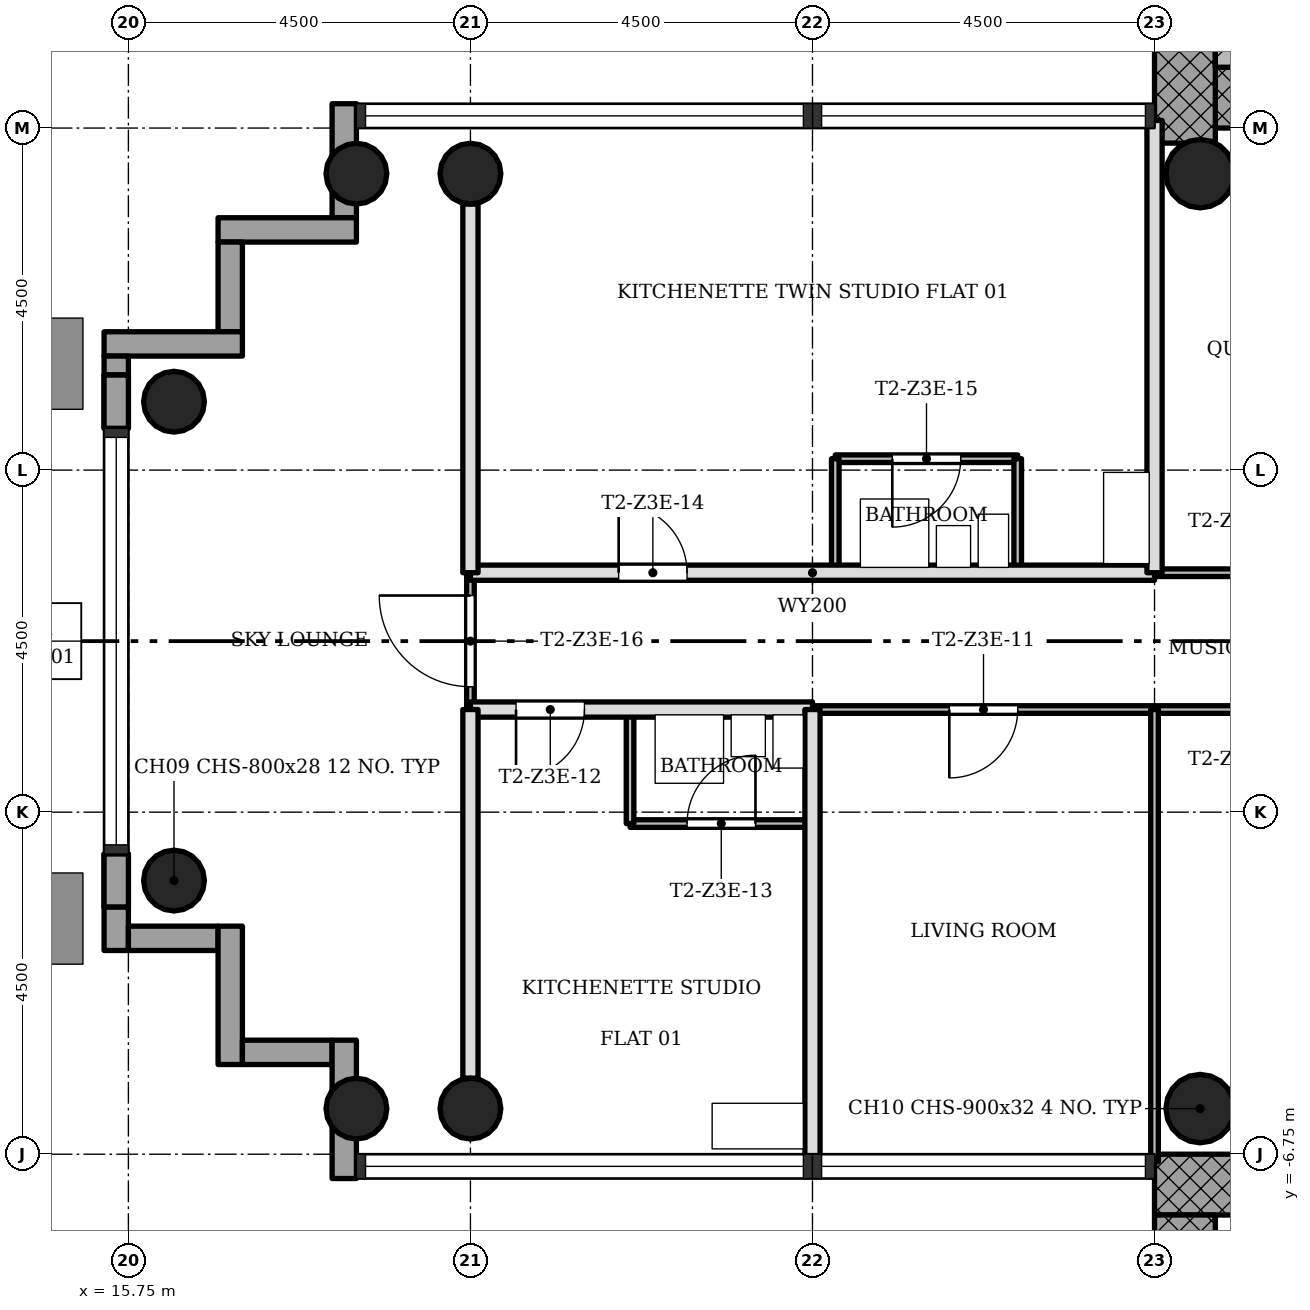
"""IFC4 building model, lengths in metres.
Left out: names, types, materials, properties, quantities, classifications, styles, units other than length and angle.
Written with IfcOpenShell. Run it as: python <this file> out.ifc"""

import sys

from ifc_helpers import new_model, si_unit, direction, frame, frame_2d, origin, origin_2d, place, context, subcontext, project, spatial, rectangle, hollow_circle, extrude, element, fill, save


model = new_model("IFC4")
c1 = context("Model", 3, precision=1e-05, world=origin(), true_north=direction((0.0, 1.0)))
c2 = subcontext(c1, "Body", "Model", "MODEL_VIEW")
j1 = project(units=[si_unit("LENGTHUNIT", "METRE"), si_unit("PLANEANGLEUNIT", "RADIAN")], contexts=[c1])
p1 = place(None, origin())
s1 = spatial("IfcSite", under=j1, at=p1, CompositionType="ELEMENT")
p2 = place(p1, origin())
s2 = spatial("IfcBuilding", under=s1, at=p2, CompositionType="ELEMENT")
p3 = place(p2, frame((0.0, 0.0, 177.9)))
s3 = spatial("IfcBuildingStorey", under=s2, at=p3, CompositionType="ELEMENT", Elevation=177.9)
p4 = place(p3, frame((30.05, 7.15, 0.0), z_axis=(0.0, 0.0, 1.0), x_axis=(1.0, 0.0, 0.0)))
e1 = element("IfcWall", 1, at=p4, inside=s3, PredefinedType="SHEAR", context=c2, shape_type="SweptSolid", body=[
    extrude(rectangle(XDim=12.7, YDim=0.8, at=frame_2d((6.35, 0.0))), origin(), (0.0, 0.0, 1.0), 3.4),
])
p5 = place(p4, frame((5.05, 0.0, 0.0)))
e2 = element("IfcOpeningElement", 2, at=p5, cuts=e1, PredefinedType="OPENING", context=c2, shape_type="SweptSolid", body=[
    extrude(rectangle(XDim=1.8, YDim=2.1, at=frame_2d((0.9, 1.05))), frame((0.0, 0.41, 0.0), z_axis=(0.0, -1.0, 0.0), x_axis=(1.0, 0.0, 0.0)), (0.0, 0.0, 1.0), 0.82),
])
p6 = place(p3, frame((29.65, 15.348, 0.0), z_axis=(0.0, 0.0, 1.0), x_axis=(0.0, -1.0, 0.0)))
e3 = element("IfcWall", 3, at=p6, inside=s3, PredefinedType="SHEAR", context=c2, shape_type="SweptSolid", body=[
    extrude(rectangle(XDim=8.796, YDim=0.8, at=frame_2d((4.398, 0.0))), origin(), (0.0, 0.0, 1.0), 3.4),
])
p7 = place(p3, frame((41.95, -7.15, 0.0), z_axis=(0.0, 0.0, 1.0), x_axis=(-1.0, 0.0, 0.0)))
e4 = element("IfcWall", 4, at=p7, inside=s3, PredefinedType="SHEAR", context=c2, shape_type="SweptSolid", body=[
    extrude(rectangle(XDim=12.7, YDim=0.8, at=frame_2d((6.35, 0.0))), origin(), (0.0, 0.0, 1.0), 3.4),
])
p8 = place(p7, frame((5.05, 0.0, 0.0)))
e5 = element("IfcOpeningElement", 5, at=p8, cuts=e4, PredefinedType="OPENING", context=c2, shape_type="SweptSolid", body=[
    extrude(rectangle(XDim=1.8, YDim=2.1, at=frame_2d((0.9, 1.05))), frame((0.0, 0.41, 0.0), z_axis=(0.0, -1.0, 0.0), x_axis=(1.0, 0.0, 0.0)), (0.0, 0.0, 1.0), 0.82),
])
p9 = place(p3, frame((29.65, -7.55, 0.0), z_axis=(0.0, 0.0, 1.0), x_axis=(0.0, -1.0, 0.0)))
e6 = element("IfcWall", 6, at=p9, inside=s3, PredefinedType="SHEAR", context=c2, shape_type="SweptSolid", body=[
    extrude(rectangle(XDim=8.2, YDim=0.8, at=frame_2d((4.1, 0.0))), origin(), (0.0, 0.0, 1.0), 3.4),
])
for number, where, z_axis, x_axis in (
    (7, (20.25, 6.15, 0.0), (0.0, 0.0, 1.0), (1.0, 0.0, 0.0)),
    (8, (20.25, -6.15, 0.0), (0.0, 0.0, 1.0), (1.0, 0.0, 0.0)),
    (9, (18.75, 6.15, 0.0), (0.0, 0.0, 1.0), (1.0, 0.0, 0.0)),
    (10, (18.75, -6.15, 0.0), (0.0, 0.0, 1.0), (1.0, 0.0, 0.0)),
    (11, (16.35, 3.15, 0.0), (0.0, 0.0, 1.0), (1.0, 0.0, 0.0)),
    (12, (16.35, -3.15, 0.0), (0.0, 0.0, 1.0), (1.0, 0.0, 0.0)),
):
    element("IfcColumn", number, at=place(p3, frame(where, z_axis=z_axis, x_axis=x_axis)), inside=s3, PredefinedType="COLUMN", context=c2, shape_type="SweptSolid", body=[
        extrude(hollow_circle(Radius=0.4, WallThickness=0.028, at=origin_2d()), origin(), (0.0, 0.0, 1.0), 3.4),
    ])
for number, where, z_axis, x_axis in (
    (13, (29.85, 6.15, 0.0), (0.0, 0.0, 1.0), (1.0, 0.0, 0.0)),
    (14, (29.85, -6.15, 0.0), (0.0, 0.0, 1.0), (1.0, 0.0, 0.0)),
):
    element("IfcColumn", number, at=place(p3, frame(where, z_axis=z_axis, x_axis=x_axis)), inside=s3, PredefinedType="COLUMN", context=c2, shape_type="SweptSolid", body=[
        extrude(hollow_circle(Radius=0.45, WallThickness=0.032, at=origin_2d()), origin(), (0.0, 0.0, 1.0), 3.4),
    ])
p10 = place(p3, frame((18.59, 7.07, -0.3), z_axis=(0.0, 0.0, 1.0), x_axis=(0.0, -1.0, 0.0)))
e15 = element("IfcWall", 15, at=p10, inside=s3, PredefinedType="STANDARD", context=c2, shape_type="SweptSolid", body=[
    extrude(rectangle(XDim=1.5, YDim=0.32, at=frame_2d((0.75, 0.0))), origin(), (0.0, 0.0, 1.0), 3.4),
])
p11 = place(p3, frame((18.75, 5.41, -0.3), z_axis=(0.0, 0.0, 1.0), x_axis=(-1.0, 0.0, 0.0)))
e16 = element("IfcWall", 16, at=p11, inside=s3, PredefinedType="STANDARD", context=c2, shape_type="SweptSolid", body=[
    extrude(rectangle(XDim=1.82, YDim=0.32, at=frame_2d((0.91, 0.0))), origin(), (0.0, 0.0, 1.0), 3.4),
])
p12 = place(p3, frame((17.09, 5.25, -0.3), z_axis=(0.0, 0.0, 1.0), x_axis=(0.0, -1.0, 0.0)))
e17 = element("IfcWall", 17, at=p12, inside=s3, PredefinedType="STANDARD", context=c2, shape_type="SweptSolid", body=[
    extrude(rectangle(XDim=1.18, YDim=0.32, at=frame_2d((0.59, 0.0))), origin(), (0.0, 0.0, 1.0), 3.4),
])
p13 = place(p3, frame((17.25, 3.91, -0.3), z_axis=(0.0, 0.0, 1.0), x_axis=(-1.0, 0.0, 0.0)))
e18 = element("IfcWall", 18, at=p13, inside=s3, PredefinedType="STANDARD", context=c2, shape_type="SweptSolid", body=[
    extrude(rectangle(XDim=1.82, YDim=0.32, at=frame_2d((0.91, 0.0))), origin(), (0.0, 0.0, 1.0), 3.4),
])
p14 = place(p3, frame((15.59, 3.75, 0.0), z_axis=(0.0, 0.0, 1.0), x_axis=(0.0, -1.0, 0.0)))
e19 = element("IfcWall", 19, at=p14, inside=s3, PredefinedType="STANDARD", context=c2, shape_type="SweptSolid", body=[
    extrude(rectangle(XDim=0.25, YDim=0.32, at=frame_2d((0.125, 0.0))), origin(), (0.0, 0.0, 1.0), 3.1),
])
p15 = place(p3, frame((15.59, 3.5, 0.0), z_axis=(0.0, 0.0, 1.0), x_axis=(0.0, -1.0, 0.0)))
e20 = element("IfcWall", 20, at=p15, inside=s3, PredefinedType="STANDARD", context=c2, shape_type="SweptSolid", body=[
    extrude(rectangle(XDim=0.7, YDim=0.32, at=frame_2d((0.35, 0.0))), origin(), (0.0, 0.0, 1.0), 2.51),
])
p16 = place(p3, frame((15.59, 3.5, 2.98), z_axis=(0.0, 0.0, 1.0), x_axis=(0.0, -1.0, 0.0)))
e21 = element("IfcWall", 21, at=p16, inside=s3, PredefinedType="STANDARD", context=c2, shape_type="SweptSolid", body=[
    extrude(rectangle(XDim=0.7, YDim=0.32, at=frame_2d((0.35, 0.0))), origin(), (0.0, 0.0, 1.0), 0.12),
])
p17 = place(p3, frame((15.59, -2.8, 0.0), z_axis=(0.0, 0.0, 1.0), x_axis=(0.0, -1.0, 0.0)))
e22 = element("IfcWall", 22, at=p17, inside=s3, PredefinedType="STANDARD", context=c2, shape_type="SweptSolid", body=[
    extrude(rectangle(XDim=0.7, YDim=0.32, at=frame_2d((0.35, 0.0))), origin(), (0.0, 0.0, 1.0), 2.51),
])
p18 = place(p3, frame((15.59, -2.8, 2.98), z_axis=(0.0, 0.0, 1.0), x_axis=(0.0, -1.0, 0.0)))
e23 = element("IfcWall", 23, at=p18, inside=s3, PredefinedType="STANDARD", context=c2, shape_type="SweptSolid", body=[
    extrude(rectangle(XDim=0.7, YDim=0.32, at=frame_2d((0.35, 0.0))), origin(), (0.0, 0.0, 1.0), 0.12),
])
p19 = place(p3, frame((15.59, -3.5, 0.0), z_axis=(0.0, 0.0, 1.0), x_axis=(0.0, -1.0, 0.0)))
e24 = element("IfcWall", 24, at=p19, inside=s3, PredefinedType="STANDARD", context=c2, shape_type="SweptSolid", body=[
    extrude(rectangle(XDim=0.57, YDim=0.32, at=frame_2d((0.285, 0.0))), origin(), (0.0, 0.0, 1.0), 3.1),
])
p20 = place(p3, frame((15.75, -3.91, -0.3), z_axis=(0.0, 0.0, 1.0), x_axis=(1.0, 0.0, 0.0)))
e25 = element("IfcWall", 25, at=p20, inside=s3, PredefinedType="STANDARD", context=c2, shape_type="SweptSolid", body=[
    extrude(rectangle(XDim=1.18, YDim=0.32, at=frame_2d((0.59, 0.0))), origin(), (0.0, 0.0, 1.0), 3.4),
])
p21 = place(p3, frame((17.09, -3.75, -0.3), z_axis=(0.0, 0.0, 1.0), x_axis=(0.0, -1.0, 0.0)))
e26 = element("IfcWall", 26, at=p21, inside=s3, PredefinedType="STANDARD", context=c2, shape_type="SweptSolid", body=[
    extrude(rectangle(XDim=1.82, YDim=0.32, at=frame_2d((0.91, 0.0))), origin(), (0.0, 0.0, 1.0), 3.4),
])
p22 = place(p3, frame((17.25, -5.41, -0.3), z_axis=(0.0, 0.0, 1.0), x_axis=(1.0, 0.0, 0.0)))
e27 = element("IfcWall", 27, at=p22, inside=s3, PredefinedType="STANDARD", context=c2, shape_type="SweptSolid", body=[
    extrude(rectangle(XDim=1.18, YDim=0.32, at=frame_2d((0.59, 0.0))), origin(), (0.0, 0.0, 1.0), 3.4),
])
p23 = place(p3, frame((18.59, -5.25, -0.3), z_axis=(0.0, 0.0, 1.0), x_axis=(0.0, -1.0, 0.0)))
e28 = element("IfcWall", 28, at=p23, inside=s3, PredefinedType="STANDARD", context=c2, shape_type="SweptSolid", body=[
    extrude(rectangle(XDim=1.82, YDim=0.32, at=frame_2d((0.91, 0.0))), origin(), (0.0, 0.0, 1.0), 3.4),
])
p24 = place(p3, frame((24.75, -2.4, 0.0), z_axis=(0.0, 0.0, 1.0), x_axis=(-1.0, 0.0, 0.0)))
e29 = element("IfcWall", 29, at=p24, inside=s3, PredefinedType="PARTITIONING", context=c2, shape_type="SweptSolid", body=[
    extrude(rectangle(XDim=2.4, YDim=0.1, at=frame_2d((1.2, 0.0))), origin(), (0.0, 0.0, 1.0), 3.0),
])
p25 = place(p24, frame((0.75, 0.0, 0.0)))
e30 = element("IfcOpeningElement", 30, at=p25, cuts=e29, PredefinedType="OPENING", context=c2, shape_type="SweptSolid", body=[
    extrude(rectangle(XDim=0.9, YDim=2.1, at=frame_2d((0.45, 1.05))), frame((0.0, 0.06, 0.0), z_axis=(0.0, -1.0, 0.0), x_axis=(1.0, 0.0, 0.0)), (0.0, 0.0, 1.0), 0.12),
])
p26 = place(p3, frame((31.5, -0.9, 0.0), z_axis=(0.0, 0.0, 1.0), x_axis=(-1.0, 0.0, 0.0)))
e31 = element("IfcWall", 31, at=p26, inside=s3, PredefinedType="PARTITIONING", context=c2, shape_type="SweptSolid", body=[
    extrude(rectangle(XDim=6.75, YDim=0.1, at=frame_2d((3.375, 0.0))), origin(), (0.0, 0.0, 1.0), 3.0),
])
p27 = place(p26, frame((4.05, 0.0, 0.0)))
e32 = element("IfcOpeningElement", 32, at=p27, cuts=e31, PredefinedType="OPENING", context=c2, shape_type="SweptSolid", body=[
    extrude(rectangle(XDim=0.9, YDim=2.1, at=frame_2d((0.45, 1.05))), frame((0.0, 0.06, 0.0), z_axis=(0.0, -1.0, 0.0), x_axis=(1.0, 0.0, 0.0)), (0.0, 0.0, 1.0), 0.12),
])
p28 = place(p3, frame((24.75, -0.9, 0.0), z_axis=(0.0, 0.0, 1.0), x_axis=(-1.0, 0.0, 0.0)))
e33 = element("IfcWall", 33, at=p28, inside=s3, PredefinedType="SOLIDWALL", context=c2, shape_type="SweptSolid", body=[
    extrude(rectangle(XDim=4.5, YDim=0.2, at=frame_2d((2.25, 0.0))), origin(), (0.0, 0.0, 1.0), 3.0),
])
p29 = place(p28, frame((3.0, 0.0, 0.0)))
e34 = element("IfcOpeningElement", 34, at=p29, cuts=e33, PredefinedType="OPENING", context=c2, shape_type="SweptSolid", body=[
    extrude(rectangle(XDim=0.9, YDim=2.1, at=frame_2d((0.45, 1.05))), frame((0.0, 0.11, 0.0), z_axis=(0.0, -1.0, 0.0), x_axis=(1.0, 0.0, 0.0)), (0.0, 0.0, 1.0), 0.22),
])
p30 = place(p3, frame((31.5, 0.9, 0.0), z_axis=(0.0, 0.0, 1.0), x_axis=(-1.0, 0.0, 0.0)))
e35 = element("IfcWall", 35, at=p30, inside=s3, PredefinedType="PARTITIONING", context=c2, shape_type="SweptSolid", body=[
    extrude(rectangle(XDim=2.25, YDim=0.1, at=frame_2d((1.125, 0.0))), origin(), (0.0, 0.0, 1.0), 3.0),
])
p31 = place(p3, frame((29.25, 0.9, 0.0), z_axis=(0.0, 0.0, 1.0), x_axis=(-1.0, 0.0, 0.0)))
e36 = element("IfcWall", 36, at=p31, inside=s3, PredefinedType="SOLIDWALL", context=c2, shape_type="SweptSolid", body=[
    extrude(rectangle(XDim=9.0, YDim=0.2, at=frame_2d((4.5, 0.0))), origin(), (0.0, 0.0, 1.0), 3.0),
])
p32 = place(p31, frame((6.15, 0.0, 0.0)))
e37 = element("IfcOpeningElement", 37, at=p32, cuts=e36, PredefinedType="OPENING", context=c2, shape_type="SweptSolid", body=[
    extrude(rectangle(XDim=0.9, YDim=2.1, at=frame_2d((0.45, 1.05))), frame((0.0, 0.11, 0.0), z_axis=(0.0, -1.0, 0.0), x_axis=(1.0, 0.0, 0.0)), (0.0, 0.0, 1.0), 0.22),
])
p33 = place(p3, frame((27.45, 2.4, 0.0), z_axis=(0.0, 0.0, 1.0), x_axis=(-1.0, 0.0, 0.0)))
e38 = element("IfcWall", 38, at=p33, inside=s3, PredefinedType="PARTITIONING", context=c2, shape_type="SweptSolid", body=[
    extrude(rectangle(XDim=2.4, YDim=0.1, at=frame_2d((1.2, 0.0))), origin(), (0.0, 0.0, 1.0), 3.0),
])
p34 = place(p33, frame((0.75, 0.0, 0.0)))
e39 = element("IfcOpeningElement", 39, at=p34, cuts=e38, PredefinedType="OPENING", context=c2, shape_type="SweptSolid", body=[
    extrude(rectangle(XDim=0.9, YDim=2.1, at=frame_2d((0.45, 1.05))), frame((0.0, 0.06, 0.0), z_axis=(0.0, -1.0, 0.0), x_axis=(1.0, 0.0, 0.0)), (0.0, 0.0, 1.0), 0.12),
])
p35 = place(p3, frame((29.25, -6.85, 0.0), z_axis=(0.0, 0.0, 1.0), x_axis=(0.0, 1.0, 0.0)))
e40 = element("IfcWall", 40, at=p35, inside=s3, PredefinedType="PARTITIONING", context=c2, shape_type="SweptSolid", body=[
    extrude(rectangle(XDim=5.95, YDim=0.1, at=frame_2d((2.975, 0.0))), origin(), (0.0, 0.0, 1.0), 3.0),
])
p36 = place(p3, frame((29.25, 0.9, 0.0), z_axis=(0.0, 0.0, 1.0), x_axis=(0.0, 1.0, 0.0)))
e41 = element("IfcWall", 41, at=p36, inside=s3, PredefinedType="SOLIDWALL", context=c2, shape_type="SweptSolid", body=[
    extrude(rectangle(XDim=5.95, YDim=0.2, at=frame_2d((2.975, 0.0))), origin(), (0.0, 0.0, 1.0), 3.0),
])
for number, where, z_axis, x_axis in (
    (42, (27.45, 0.9, 0.0), (0.0, 0.0, 1.0), (0.0, 1.0, 0.0)),
    (43, (25.05, 0.9, 0.0), (0.0, 0.0, 1.0), (0.0, 1.0, 0.0)),
):
    element("IfcWall", number, at=place(p3, frame(where, z_axis=z_axis, x_axis=x_axis)), inside=s3, PredefinedType="PARTITIONING", context=c2, shape_type="SweptSolid", body=[
        extrude(rectangle(XDim=1.5, YDim=0.1, at=frame_2d((0.75, 0.0))), origin(), (0.0, 0.0, 1.0), 3.0),
    ])
p37 = place(p3, frame((24.75, -6.85, 0.0), z_axis=(0.0, 0.0, 1.0), x_axis=(0.0, 1.0, 0.0)))
e44 = element("IfcWall", 44, at=p37, inside=s3, PredefinedType="SOLIDWALL", context=c2, shape_type="SweptSolid", body=[
    extrude(rectangle(XDim=5.95, YDim=0.2, at=frame_2d((2.975, 0.0))), origin(), (0.0, 0.0, 1.0), 3.0),
])
p38 = place(p3, frame((22.35, -2.4, 0.0), z_axis=(0.0, 0.0, 1.0), x_axis=(0.0, 1.0, 0.0)))
e45 = element("IfcWall", 45, at=p38, inside=s3, PredefinedType="PARTITIONING", context=c2, shape_type="SweptSolid", body=[
    extrude(rectangle(XDim=1.5, YDim=0.1, at=frame_2d((0.75, 0.0))), origin(), (0.0, 0.0, 1.0), 3.0),
])
p39 = place(p3, frame((20.25, -0.9, 0.0), z_axis=(0.0, 0.0, 1.0), x_axis=(0.0, 1.0, 0.0)))
e46 = element("IfcWall", 46, at=p39, inside=s3, PredefinedType="PARTITIONING", context=c2, shape_type="SweptSolid", body=[
    extrude(rectangle(XDim=1.8, YDim=0.1, at=frame_2d((0.9, 0.0))), origin(), (0.0, 0.0, 1.0), 3.0),
])
p40 = place(p39, frame((0.3, 0.0, 0.0)))
e47 = element("IfcOpeningElement", 47, at=p40, cuts=e46, PredefinedType="OPENING", context=c2, shape_type="SweptSolid", body=[
    extrude(rectangle(XDim=1.2, YDim=2.1, at=frame_2d((0.6, 1.05))), frame((0.0, 0.06, 0.0), z_axis=(0.0, -1.0, 0.0), x_axis=(1.0, 0.0, 0.0)), (0.0, 0.0, 1.0), 0.12),
])
for number, where, z_axis, x_axis in (
    (48, (20.25, -5.75, 0.0), (0.0, 0.0, 1.0), (0.0, 1.0, 0.0)),
    (49, (20.25, 0.9, 0.0), (0.0, 0.0, 1.0), (0.0, 1.0, 0.0)),
):
    element("IfcWall", number, at=place(p3, frame(where, z_axis=z_axis, x_axis=x_axis)), inside=s3, PredefinedType="SOLIDWALL", context=c2, shape_type="SweptSolid", body=[
        extrude(rectangle(XDim=4.85, YDim=0.2, at=frame_2d((2.425, 0.0))), origin(), (0.0, 0.0, 1.0), 3.0),
    ])
p41 = place(p3, frame((34.15, 7.75, 0.0), z_axis=(0.0, 0.0, 1.0), x_axis=(-1.0, 0.0, 0.0)))
e50 = element("IfcWall", 50, at=p41, inside=s3, PredefinedType="SHEAR", context=c2, shape_type="SweptSolid", body=[
    extrude(rectangle(XDim=4.1, YDim=0.4, at=frame_2d((2.05, 0.0))), origin(), (0.0, 0.0, 1.0), 3.4),
])
p42 = place(p27, origin())
e51 = element("IfcDoor", 51, at=p42, inside=s3, OperationType="SINGLE_SWING_LEFT", PredefinedType="DOOR", context=c2, shape_type="SweptSolid", body=[
    extrude(rectangle(XDim=0.9, YDim=2.1, at=frame_2d((0.45, 1.05))), frame((0.0, 0.025, 0.0), z_axis=(0.0, -1.0, 0.0), x_axis=(1.0, 0.0, 0.0)), (0.0, 0.0, 1.0), 0.05),
])
fill(e32, e51)
p43 = place(p29, origin())
e52 = element("IfcDoor", 52, at=p43, inside=s3, OperationType="SINGLE_SWING_LEFT", PredefinedType="DOOR", context=c2, shape_type="SweptSolid", body=[
    extrude(rectangle(XDim=0.9, YDim=2.1, at=frame_2d((0.45, 1.05))), frame((0.0, 0.025, 0.0), z_axis=(0.0, -1.0, 0.0), x_axis=(1.0, 0.0, 0.0)), (0.0, 0.0, 1.0), 0.05),
])
fill(e34, e52)
p44 = place(p25, origin())
e53 = element("IfcDoor", 53, at=p44, inside=s3, OperationType="SINGLE_SWING_LEFT", PredefinedType="DOOR", context=c2, shape_type="SweptSolid", body=[
    extrude(rectangle(XDim=0.9, YDim=2.1, at=frame_2d((0.45, 1.05))), frame((0.0, 0.025, 0.0), z_axis=(0.0, -1.0, 0.0), x_axis=(1.0, 0.0, 0.0)), (0.0, 0.0, 1.0), 0.05),
])
fill(e30, e53)
p45 = place(p32, origin())
e54 = element("IfcDoor", 54, at=p45, inside=s3, OperationType="SINGLE_SWING_RIGHT", PredefinedType="DOOR", context=c2, shape_type="SweptSolid", body=[
    extrude(rectangle(XDim=0.9, YDim=2.1, at=frame_2d((0.45, 1.05))), frame((0.0, 0.025, 0.0), z_axis=(0.0, -1.0, 0.0), x_axis=(1.0, 0.0, 0.0)), (0.0, 0.0, 1.0), 0.05),
])
fill(e37, e54)
p46 = place(p34, origin())
e55 = element("IfcDoor", 55, at=p46, inside=s3, OperationType="SINGLE_SWING_LEFT", PredefinedType="DOOR", context=c2, shape_type="SweptSolid", body=[
    extrude(rectangle(XDim=0.9, YDim=2.1, at=frame_2d((0.45, 1.05))), frame((0.0, 0.025, 0.0), z_axis=(0.0, -1.0, 0.0), x_axis=(1.0, 0.0, 0.0)), (0.0, 0.0, 1.0), 0.05),
])
fill(e39, e55)
p47 = place(p40, origin())
e56 = element("IfcDoor", 56, at=p47, inside=s3, OperationType="SINGLE_SWING_LEFT", PredefinedType="DOOR", context=c2, shape_type="SweptSolid", body=[
    extrude(rectangle(XDim=1.2, YDim=2.1, at=frame_2d((0.6, 1.05))), frame((0.0, 0.025, 0.0), z_axis=(0.0, -1.0, 0.0), x_axis=(1.0, 0.0, 0.0)), (0.0, 0.0, 1.0), 0.05),
])
fill(e47, e56)
save(model, sys.argv[1])
